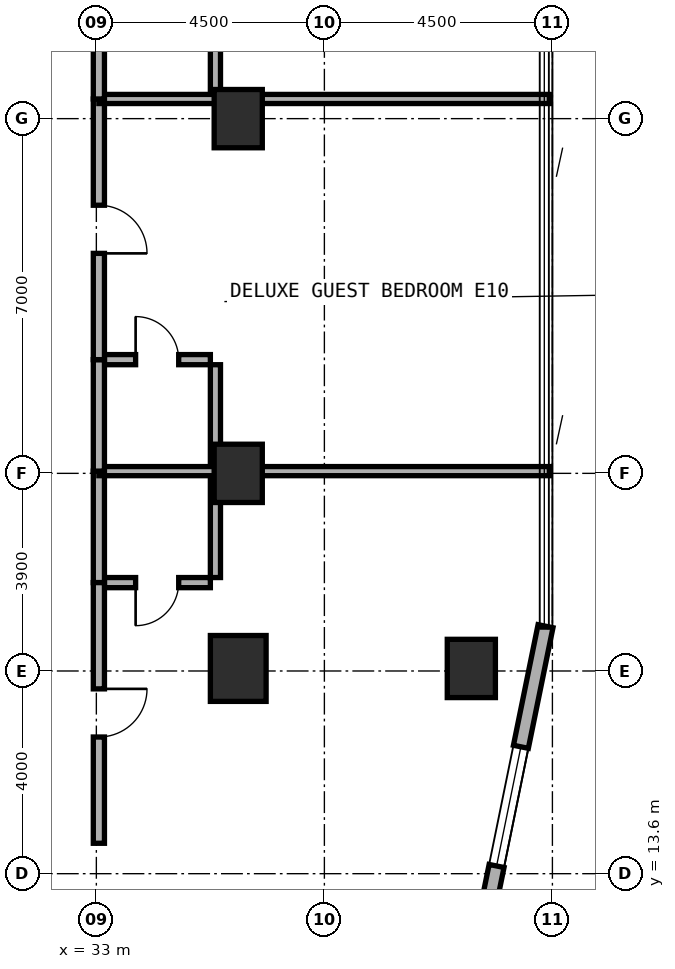
"""IFC4 building model, lengths in metres.
Left out: names, types, materials, properties, quantities, classifications, styles, units other than length and angle.
Written with IfcOpenShell. Run it as: python <this file> out.ifc"""

import sys

from ifc_helpers import new_model, si_unit, direction, frame, frame_2d, origin, origin_2d, place, context, subcontext, project, spatial, rectangle, extrude, element, fill, save


model = new_model("IFC4")
c1 = context("Model", 3, precision=1e-05, world=origin(), true_north=direction((0.0, 1.0)))
c2 = subcontext(c1, "Body", "Model", "MODEL_VIEW")
j1 = project(units=[si_unit("LENGTHUNIT", "METRE"), si_unit("PLANEANGLEUNIT", "RADIAN")], contexts=[c1])
p1 = place(None, origin())
s1 = spatial("IfcSite", under=j1, at=p1, CompositionType="ELEMENT")
p2 = place(p1, origin())
s2 = spatial("IfcBuilding", under=s1, at=p2, CompositionType="ELEMENT")
p3 = place(p2, frame((0.0, 0.0, 48.5)))
s3 = spatial("IfcBuildingStorey", under=s2, at=p3, CompositionType="ELEMENT", Elevation=48.5)
for number, where, z_axis, x_axis in (
    (1, (35.8, 21.5, 0.0), (0.0, 0.0, 1.0), (1.0, 0.0, 0.0)),
    (2, (35.8, 28.5, 0.0), (0.0, 0.0, 1.0), (1.0, 0.0, 0.0)),
):
    element("IfcColumn", number, at=place(p3, frame(where, z_axis=z_axis, x_axis=x_axis)), inside=s3, PredefinedType="COLUMN", context=c2, shape_type="SweptSolid", body=[
        extrude(rectangle(XDim=0.95, YDim=1.15, at=origin_2d()), origin(), (0.0, 0.0, 1.0), 3.5),
    ])
p4 = place(p3, frame((35.8, 17.65, 0.0), z_axis=(0.0, 0.0, 1.0), x_axis=(1.0, 0.0, 0.0)))
e3 = element("IfcColumn", 3, at=p4, inside=s3, PredefinedType="COLUMN", context=c2, shape_type="SweptSolid", body=[
    extrude(rectangle(XDim=1.1, YDim=1.3, at=origin_2d()), origin(), (0.0, 0.0, 1.0), 3.5),
])
p5 = place(p3, frame((40.4, 17.65, 0.0), z_axis=(0.0, 0.0, 1.0), x_axis=(1.0, 0.0, 0.0)))
e4 = element("IfcColumn", 4, at=p5, inside=s3, PredefinedType="COLUMN", context=c2, shape_type="SweptSolid", body=[
    extrude(rectangle(XDim=0.95, YDim=1.15, at=origin_2d()), origin(), (0.0, 0.0, 1.0), 3.5),
])
p6 = place(p3, frame((39.851, 8.622, 0.0), z_axis=(0.0, 0.0, 1.0), x_axis=(0.199990901713, 0.979797754249, 0.0)))
e5 = element("IfcWall", 5, at=p6, inside=s3, PredefinedType="STANDARD", context=c2, shape_type="SweptSolid", body=[
    extrude(rectangle(XDim=10.065, YDim=0.3, at=frame_2d((5.033, 0.0))), origin(), (0.0, 0.0, 1.0), 3.22),
])
p7 = place(p6, frame((0.378, 0.0, 0.85)))
e6 = element("IfcOpeningElement", 6, at=p7, cuts=e5, PredefinedType="OPENING", context=c2, shape_type="SweptSolid", body=[
    extrude(rectangle(XDim=1.8, YDim=1.5, at=frame_2d((0.9, 0.75))), frame((0.0, 0.16, 0.0), z_axis=(0.0, -1.0, 0.0), x_axis=(1.0, 0.0, 0.0)), (0.0, 0.0, 1.0), 0.32),
])
p8 = place(p6, frame((5.236, 0.0, 0.8)))
e7 = element("IfcOpeningElement", 7, at=p8, cuts=e5, PredefinedType="OPENING", context=c2, shape_type="SweptSolid", body=[
    extrude(rectangle(XDim=2.4, YDim=1.6, at=frame_2d((1.2, 0.8))), frame((0.0, 0.16, 0.0), z_axis=(0.0, -1.0, 0.0), x_axis=(1.0, 0.0, 0.0)), (0.0, 0.0, 1.0), 0.32),
])
p9 = place(p3, frame((33.15, 19.344, 0.0), z_axis=(0.0, 0.0, 1.0), x_axis=(1.0, 0.0, 0.0)))
e8 = element("IfcWall", 8, at=p9, inside=s3, PredefinedType="PLUMBINGWALL", context=c2, shape_type="SweptSolid", body=[
    extrude(rectangle(XDim=2.1, YDim=0.2, at=frame_2d((1.05, 0.0))), origin(), (0.0, 0.0, 1.0), 3.22),
])
p10 = place(p9, frame((0.625, 0.0, 0.0)))
e9 = element("IfcOpeningElement", 9, at=p10, cuts=e8, PredefinedType="OPENING", context=c2, shape_type="SweptSolid", body=[
    extrude(rectangle(XDim=0.85, YDim=2.1, at=frame_2d((0.425, 1.05))), frame((0.0, 0.11, 0.0), z_axis=(0.0, -1.0, 0.0), x_axis=(1.0, 0.0, 0.0)), (0.0, 0.0, 1.0), 0.22),
])
p11 = place(p3, frame((35.35, 19.444, 0.0), z_axis=(0.0, 0.0, 1.0), x_axis=(0.0, 1.0, 0.0)))
e10 = element("IfcWall", 10, at=p11, inside=s3, PredefinedType="PLUMBINGWALL", context=c2, shape_type="SweptSolid", body=[
    extrude(rectangle(XDim=2.0, YDim=0.2, at=frame_2d((1.0, 0.0))), origin(), (0.0, 0.0, 1.0), 2.395),
])
p12 = place(p3, frame((33.05, 19.344, 0.0), z_axis=(0.0, 0.0, 1.0), x_axis=(0.0, 1.0, 0.0)))
e11 = element("IfcWall", 11, at=p12, inside=s3, PredefinedType="SOLIDWALL", context=c2, shape_type="SweptSolid", body=[
    extrude(rectangle(XDim=2.2, YDim=0.22, at=frame_2d((1.1, 0.0))), origin(), (0.0, 0.0, 1.0), 2.395),
])
p13 = place(p3, frame((33.05, 14.2, 0.0), z_axis=(0.0, 0.0, 1.0), x_axis=(0.0, 1.0, 0.0)))
e12 = element("IfcWall", 12, at=p13, inside=s3, PredefinedType="SOLIDWALL", context=c2, shape_type="SweptSolid", body=[
    extrude(rectangle(XDim=5.144, YDim=0.22, at=frame_2d((2.572, 0.0))), origin(), (0.0, 0.0, 1.0), 2.395),
])
p14 = place(p13, frame((2.097, 0.0, 0.0)))
e13 = element("IfcOpeningElement", 13, at=p14, cuts=e12, PredefinedType="OPENING", context=c2, shape_type="SweptSolid", body=[
    extrude(rectangle(XDim=0.95, YDim=2.1, at=frame_2d((0.475, 1.05))), frame((0.0, 0.12, 0.0), z_axis=(0.0, -1.0, 0.0), x_axis=(1.0, 0.0, 0.0)), (0.0, 0.0, 1.0), 0.24),
])
p15 = place(p3, frame((33.05, 21.544, 0.0), z_axis=(0.0, 0.0, 1.0), x_axis=(1.0, 0.0, 0.0)))
e14 = element("IfcWall", 14, at=p15, inside=s3, PredefinedType="SOLIDWALL", context=c2, shape_type="SweptSolid", body=[
    extrude(rectangle(XDim=8.89, YDim=0.18, at=frame_2d((4.445, 0.0))), origin(), (0.0, 0.0, 1.0), 2.395),
])
p16 = place(p3, frame((33.15, 23.744, 0.0), z_axis=(0.0, 0.0, 1.0), x_axis=(1.0, 0.0, 0.0)))
e15 = element("IfcWall", 15, at=p16, inside=s3, PredefinedType="PLUMBINGWALL", context=c2, shape_type="SweptSolid", body=[
    extrude(rectangle(XDim=2.1, YDim=0.2, at=frame_2d((1.05, 0.0))), origin(), (0.0, 0.0, 1.0), 3.22),
])
p17 = place(p16, frame((0.625, 0.0, 0.0)))
e16 = element("IfcOpeningElement", 16, at=p17, cuts=e15, PredefinedType="OPENING", context=c2, shape_type="SweptSolid", body=[
    extrude(rectangle(XDim=0.85, YDim=2.1, at=frame_2d((0.425, 1.05))), frame((0.0, 0.11, 0.0), z_axis=(0.0, -1.0, 0.0), x_axis=(1.0, 0.0, 0.0)), (0.0, 0.0, 1.0), 0.22),
])
p18 = place(p3, frame((35.35, 21.644, 0.0), z_axis=(0.0, 0.0, 1.0), x_axis=(0.0, 1.0, 0.0)))
e17 = element("IfcWall", 17, at=p18, inside=s3, PredefinedType="PLUMBINGWALL", context=c2, shape_type="SweptSolid", body=[
    extrude(rectangle(XDim=2.0, YDim=0.2, at=frame_2d((1.0, 0.0))), origin(), (0.0, 0.0, 1.0), 3.22),
])
p19 = place(p3, frame((33.05, 21.544, 0.0), z_axis=(0.0, 0.0, 1.0), x_axis=(0.0, 1.0, 0.0)))
e18 = element("IfcWall", 18, at=p19, inside=s3, PredefinedType="SOLIDWALL", context=c2, shape_type="SweptSolid", body=[
    extrude(rectangle(XDim=2.2, YDim=0.22, at=frame_2d((1.1, 0.0))), origin(), (0.0, 0.0, 1.0), 2.395),
])
p20 = place(p3, frame((33.05, 23.744, 0.0), z_axis=(0.0, 0.0, 1.0), x_axis=(0.0, 1.0, 0.0)))
e19 = element("IfcWall", 19, at=p20, inside=s3, PredefinedType="SOLIDWALL", context=c2, shape_type="SweptSolid", body=[
    extrude(rectangle(XDim=5.144, YDim=0.22, at=frame_2d((2.572, 0.0))), origin(), (0.0, 0.0, 1.0), 2.395),
])
p21 = place(p20, frame((2.097, 0.0, 0.0)))
e20 = element("IfcOpeningElement", 20, at=p21, cuts=e19, PredefinedType="OPENING", context=c2, shape_type="SweptSolid", body=[
    extrude(rectangle(XDim=0.95, YDim=2.1, at=frame_2d((0.475, 1.05))), frame((0.0, 0.12, 0.0), z_axis=(0.0, -1.0, 0.0), x_axis=(1.0, 0.0, 0.0)), (0.0, 0.0, 1.0), 0.24),
])
p22 = place(p3, frame((33.05, 28.888, 0.0), z_axis=(0.0, 0.0, 1.0), x_axis=(1.0, 0.0, 0.0)))
e21 = element("IfcWall", 21, at=p22, inside=s3, PredefinedType="SOLIDWALL", context=c2, shape_type="SweptSolid", body=[
    extrude(rectangle(XDim=8.89, YDim=0.18, at=frame_2d((4.445, 0.0))), origin(), (0.0, 0.0, 1.0), 2.745),
])
p23 = place(p3, frame((35.35, 28.988, 0.0), z_axis=(0.0, 0.0, 1.0), x_axis=(0.0, 1.0, 0.0)))
e22 = element("IfcWall", 22, at=p23, inside=s3, PredefinedType="PLUMBINGWALL", context=c2, shape_type="SweptSolid", body=[
    extrude(rectangle(XDim=2.0, YDim=0.2, at=frame_2d((1.0, 0.0))), origin(), (0.0, 0.0, 1.0), 3.22),
])
p24 = place(p3, frame((33.05, 28.888, 0.0), z_axis=(0.0, 0.0, 1.0), x_axis=(0.0, 1.0, 0.0)))
e23 = element("IfcWall", 23, at=p24, inside=s3, PredefinedType="SOLIDWALL", context=c2, shape_type="SweptSolid", body=[
    extrude(rectangle(XDim=2.2, YDim=0.22, at=frame_2d((1.1, 0.0))), origin(), (0.0, 0.0, 1.0), 3.22),
])
p25 = place(p8, origin())
e24 = element("IfcWindow", 24, at=p25, inside=s3, PartitioningType="SINGLE_PANEL", PredefinedType="WINDOW", context=c2, shape_type="SweptSolid", body=[
    extrude(rectangle(XDim=2.4, YDim=1.6, at=frame_2d((1.2, 0.8))), frame((0.0, 0.03, 0.0), z_axis=(0.0, -1.0, 0.0), x_axis=(1.0, 0.0, 0.0)), (0.0, 0.0, 1.0), 0.06),
])
fill(e7, e24)
p26 = place(p10, frame((0.85, 0.0, 0.0), z_axis=(0.0, 0.0, 1.0), x_axis=(-1.0, 0.0, 0.0)))
e25 = element("IfcDoor", 25, at=p26, inside=s3, OperationType="SINGLE_SWING_RIGHT", PredefinedType="DOOR", context=c2, shape_type="SweptSolid", body=[
    extrude(rectangle(XDim=0.85, YDim=2.1, at=frame_2d((0.425, 1.05))), frame((0.0, 0.025, 0.0), z_axis=(0.0, -1.0, 0.0), x_axis=(1.0, 0.0, 0.0)), (0.0, 0.0, 1.0), 0.05),
])
fill(e9, e25)
p27 = place(p14, frame((0.95, 0.0, 0.0), z_axis=(0.0, 0.0, 1.0), x_axis=(-1.0, 0.0, 0.0)))
e26 = element("IfcDoor", 26, at=p27, inside=s3, OperationType="SINGLE_SWING_LEFT", PredefinedType="DOOR", context=c2, shape_type="SweptSolid", body=[
    extrude(rectangle(XDim=0.95, YDim=2.1, at=frame_2d((0.475, 1.05))), frame((0.0, 0.025, 0.0), z_axis=(0.0, -1.0, 0.0), x_axis=(1.0, 0.0, 0.0)), (0.0, 0.0, 1.0), 0.05),
])
fill(e13, e26)
p28 = place(p17, origin())
e27 = element("IfcDoor", 27, at=p28, inside=s3, OperationType="SINGLE_SWING_LEFT", PredefinedType="DOOR", context=c2, shape_type="SweptSolid", body=[
    extrude(rectangle(XDim=0.85, YDim=2.1, at=frame_2d((0.425, 1.05))), frame((0.0, 0.025, 0.0), z_axis=(0.0, -1.0, 0.0), x_axis=(1.0, 0.0, 0.0)), (0.0, 0.0, 1.0), 0.05),
])
fill(e16, e27)
p29 = place(p21, frame((0.95, 0.0, 0.0), z_axis=(0.0, 0.0, 1.0), x_axis=(-1.0, 0.0, 0.0)))
e28 = element("IfcDoor", 28, at=p29, inside=s3, OperationType="SINGLE_SWING_RIGHT", PredefinedType="DOOR", context=c2, shape_type="SweptSolid", body=[
    extrude(rectangle(XDim=0.95, YDim=2.1, at=frame_2d((0.475, 1.05))), frame((0.0, 0.025, 0.0), z_axis=(0.0, -1.0, 0.0), x_axis=(1.0, 0.0, 0.0)), (0.0, 0.0, 1.0), 0.05),
])
fill(e20, e28)
save(model, sys.argv[1])
